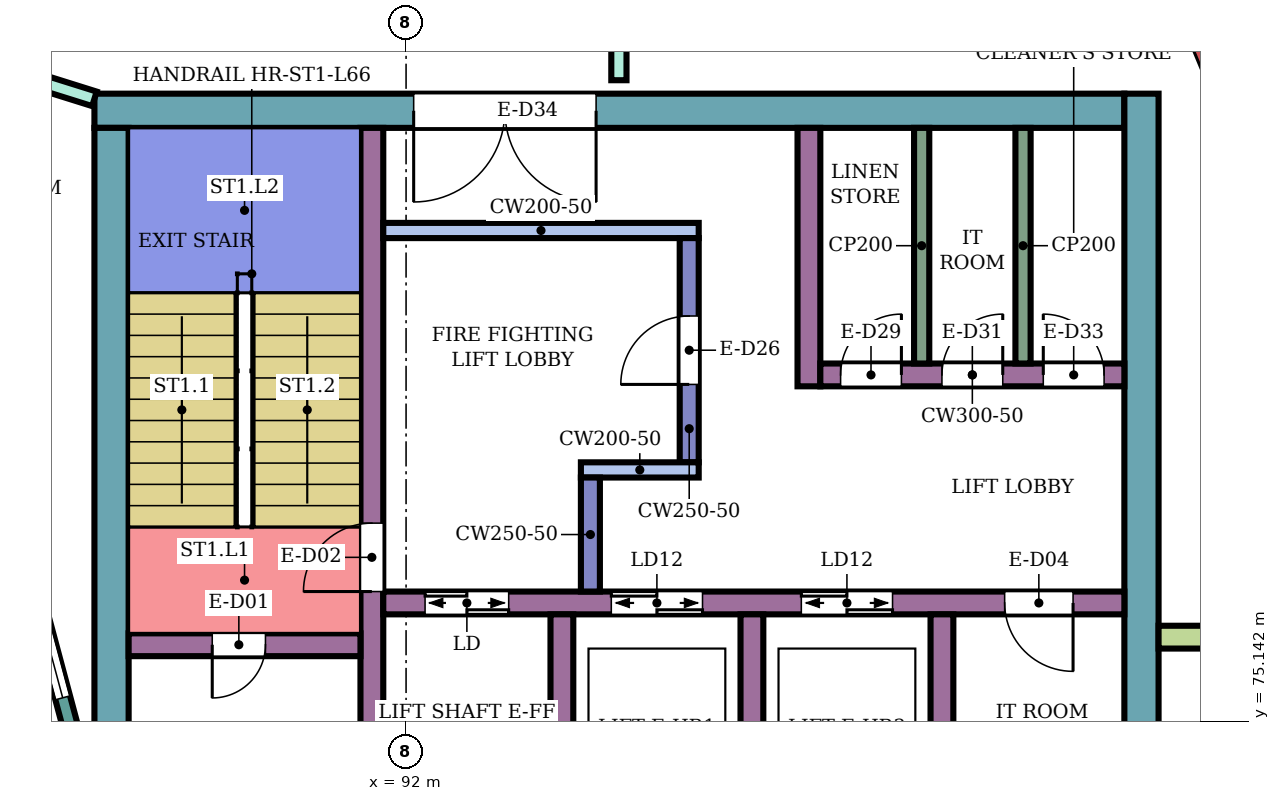
"""IFC4 building model, lengths in metres.
Left out: names, types, materials, properties, quantities, classifications, styles, units other than length and angle.
Written with IfcOpenShell. Run it as: python <this file> out.ifc"""

import sys

from ifc_helpers import new_model, si_unit, direction, frame, frame_2d, origin, place, context, subcontext, project, spatial, rectangle, extrude, element, fill, save


model = new_model("IFC4")
c1 = context("Model", 3, precision=1e-05, world=origin(), true_north=direction((0.0, 1.0)))
c2 = subcontext(c1, "Body", "Model", "MODEL_VIEW")
j1 = project(units=[si_unit("LENGTHUNIT", "METRE"), si_unit("PLANEANGLEUNIT", "RADIAN")], contexts=[c1])
p1 = place(None, origin())
s1 = spatial("IfcSite", under=j1, at=p1, CompositionType="ELEMENT")
p2 = place(p1, origin())
s2 = spatial("IfcBuilding", under=s1, at=p2, CompositionType="ELEMENT")
p3 = place(p2, frame((0.0, 0.0, 288.3)))
s3 = spatial("IfcBuildingStorey", under=s2, at=p3, CompositionType="ELEMENT", Elevation=288.3)
p4 = place(p3, frame((87.9, 83.175, 0.0), z_axis=(0.0, 0.0, 1.0), x_axis=(1.0, 0.0, 0.0)))
e1 = element("IfcWall", 1, at=p4, inside=s3, PredefinedType="SHEAR", context=c2, shape_type="SweptSolid", body=[
    extrude(rectangle(XDim=13.55, YDim=0.45, at=frame_2d((6.775, 0.0))), origin(), (0.0, 0.0, 1.0), 3.88),
])
p5 = place(p4, frame((4.2, 0.0, 0.0)))
e2 = element("IfcOpeningElement", 2, at=p5, cuts=e1, PredefinedType="OPENING", context=c2, shape_type="SweptSolid", body=[
    extrude(rectangle(XDim=2.4, YDim=2.4, at=frame_2d((1.2, 1.2))), frame((0.0, 0.235, 0.0), z_axis=(0.0, -1.0, 0.0), x_axis=(1.0, 0.0, 0.0)), (0.0, 0.0, 1.0), 0.47),
])
p6 = place(p3, frame((88.125, 75.0, 0.0), z_axis=(0.0, 0.0, 1.0), x_axis=(0.0, 1.0, 0.0)))
e3 = element("IfcWall", 3, at=p6, inside=s3, PredefinedType="SHEAR", context=c2, shape_type="SweptSolid", body=[
    extrude(rectangle(XDim=7.95, YDim=0.45, at=frame_2d((3.975, 0.0))), origin(), (0.0, 0.0, 1.0), 3.88),
])
p7 = place(p3, frame((101.675, 66.6, 0.0), z_axis=(0.0, 0.0, 1.0), x_axis=(0.0, 1.0, 0.0)))
e4 = element("IfcWall", 4, at=p7, inside=s3, PredefinedType="SHEAR", context=c2, shape_type="SweptSolid", body=[
    extrude(rectangle(XDim=16.8, YDim=0.45, at=frame_2d((8.4, 0.0))), origin(), (0.0, 0.0, 1.0), 3.88),
])
p8 = place(p3, frame((91.55, 75.0, 0.0), z_axis=(0.0, 0.0, 1.0), x_axis=(0.0, 1.0, 0.0)))
e5 = element("IfcWall", 5, at=p8, inside=s3, PredefinedType="SHEAR", context=c2, shape_type="SweptSolid", body=[
    extrude(rectangle(XDim=7.95, YDim=0.3, at=frame_2d((3.975, 0.0))), origin(), (0.0, 0.0, 1.0), 3.88),
])
p9 = place(p8, frame((1.85, 0.0, 0.0)))
e6 = element("IfcOpeningElement", 6, at=p9, cuts=e5, PredefinedType="OPENING", context=c2, shape_type="SweptSolid", body=[
    extrude(rectangle(XDim=0.9, YDim=2.1, at=frame_2d((0.45, 1.05))), frame((0.0, 0.16, 0.0), z_axis=(0.0, -1.0, 0.0), x_axis=(1.0, 0.0, 0.0)), (0.0, 0.0, 1.0), 0.32),
])
p10 = place(p3, frame((88.35, 76.15, 0.0), z_axis=(0.0, 0.0, 1.0), x_axis=(1.0, 0.0, 0.0)))
e7 = element("IfcWall", 7, at=p10, inside=s3, PredefinedType="SHEAR", context=c2, shape_type="SweptSolid", body=[
    extrude(rectangle(XDim=3.05, YDim=0.3, at=frame_2d((1.525, 0.0))), origin(), (0.0, 0.0, 1.0), 3.88),
])
p11 = place(p10, frame((1.1, 0.0, 0.0)))
e8 = element("IfcOpeningElement", 8, at=p11, cuts=e7, PredefinedType="OPENING", context=c2, shape_type="SweptSolid", body=[
    extrude(rectangle(XDim=0.7, YDim=2.0, at=frame_2d((0.35, 1.0))), frame((0.0, 0.16, 0.0), z_axis=(0.0, -1.0, 0.0), x_axis=(1.0, 0.0, 0.0)), (0.0, 0.0, 1.0), 0.32),
])
p12 = place(p3, frame((91.7, 76.7, 0.0), z_axis=(0.0, 0.0, 1.0), x_axis=(1.0, 0.0, 0.0)))
e9 = element("IfcWall", 9, at=p12, inside=s3, PredefinedType="SHEAR", context=c2, shape_type="SweptSolid", body=[
    extrude(rectangle(XDim=9.75, YDim=0.3, at=frame_2d((4.875, 0.0))), origin(), (0.0, 0.0, 1.0), 3.88),
])
p13 = place(p12, frame((0.55, 0.0, 0.0)))
e10 = element("IfcOpeningElement", 10, at=p13, cuts=e9, PredefinedType="OPENING", context=c2, shape_type="SweptSolid", body=[
    extrude(rectangle(XDim=1.1, YDim=2.1, at=frame_2d((0.55, 1.05))), frame((0.0, 0.16, 0.0), z_axis=(0.0, -1.0, 0.0), x_axis=(1.0, 0.0, 0.0)), (0.0, 0.0, 1.0), 0.32),
])
p14 = place(p12, frame((3.0, 0.0, 0.0)))
e11 = element("IfcOpeningElement", 11, at=p14, cuts=e9, PredefinedType="OPENING", context=c2, shape_type="SweptSolid", body=[
    extrude(rectangle(XDim=1.2, YDim=2.1, at=frame_2d((0.6, 1.05))), frame((0.0, 0.16, 0.0), z_axis=(0.0, -1.0, 0.0), x_axis=(1.0, 0.0, 0.0)), (0.0, 0.0, 1.0), 0.32),
])
p15 = place(p12, frame((5.5, 0.0, 0.0)))
e12 = element("IfcOpeningElement", 12, at=p15, cuts=e9, PredefinedType="OPENING", context=c2, shape_type="SweptSolid", body=[
    extrude(rectangle(XDim=1.2, YDim=2.1, at=frame_2d((0.6, 1.05))), frame((0.0, 0.16, 0.0), z_axis=(0.0, -1.0, 0.0), x_axis=(1.0, 0.0, 0.0)), (0.0, 0.0, 1.0), 0.32),
])
p16 = place(p12, frame((8.175, 0.0, 0.0)))
e13 = element("IfcOpeningElement", 13, at=p16, cuts=e9, PredefinedType="OPENING", context=c2, shape_type="SweptSolid", body=[
    extrude(rectangle(XDim=0.9, YDim=2.1, at=frame_2d((0.45, 1.05))), frame((0.0, 0.16, 0.0), z_axis=(0.0, -1.0, 0.0), x_axis=(1.0, 0.0, 0.0)), (0.0, 0.0, 1.0), 0.32),
])
for number, where, z_axis, x_axis in (
    (14, (94.05, 74.0, 0.0), (0.0, 0.0, 1.0), (0.0, 1.0, 0.0)),
    (15, (96.55, 74.0, 0.0), (0.0, 0.0, 1.0), (0.0, 1.0, 0.0)),
    (16, (99.05, 74.0, 0.0), (0.0, 0.0, 1.0), (0.0, 1.0, 0.0)),
):
    element("IfcWall", number, at=place(p3, frame(where, z_axis=z_axis, x_axis=x_axis)), inside=s3, PredefinedType="SHEAR", context=c2, shape_type="SweptSolid", body=[
        extrude(rectangle(XDim=2.55, YDim=0.3, at=frame_2d((1.275, 0.0))), origin(), (0.0, 0.0, 1.0), 3.88),
    ])
p17 = place(p3, frame((91.7, 81.6, 0.0), z_axis=(0.0, 0.0, 1.0), x_axis=(1.0, 0.0, 0.0)))
e17 = element("IfcWall", 17, at=p17, inside=s3, PredefinedType="SHEAR", context=c2, shape_type="SweptSolid", body=[
    extrude(rectangle(XDim=4.15, YDim=0.2, at=frame_2d((2.075, 0.0))), origin(), (0.0, 0.0, 1.0), 3.88),
])
p18 = place(p3, frame((95.725, 78.55, 0.0), z_axis=(0.0, 0.0, 1.0), x_axis=(0.0, 1.0, 0.0)))
e18 = element("IfcWall", 18, at=p18, inside=s3, PredefinedType="SHEAR", context=c2, shape_type="SweptSolid", body=[
    extrude(rectangle(XDim=2.95, YDim=0.25, at=frame_2d((1.475, 0.0))), origin(), (0.0, 0.0, 1.0), 3.88),
])
p19 = place(p18, frame((1.025, 0.0, 0.0)))
e19 = element("IfcOpeningElement", 19, at=p19, cuts=e18, PredefinedType="OPENING", context=c2, shape_type="SweptSolid", body=[
    extrude(rectangle(XDim=0.9, YDim=2.1, at=frame_2d((0.45, 1.05))), frame((0.0, 0.135, 0.0), z_axis=(0.0, -1.0, 0.0), x_axis=(1.0, 0.0, 0.0)), (0.0, 0.0, 1.0), 0.27),
])
p20 = place(p3, frame((94.3, 78.45, 0.0), z_axis=(0.0, 0.0, 1.0), x_axis=(1.0, 0.0, 0.0)))
e20 = element("IfcWall", 20, at=p20, inside=s3, PredefinedType="SHEAR", context=c2, shape_type="SweptSolid", body=[
    extrude(rectangle(XDim=1.55, YDim=0.2, at=frame_2d((0.775, 0.0))), origin(), (0.0, 0.0, 1.0), 3.88),
])
p21 = place(p3, frame((94.425, 76.85, 0.0), z_axis=(0.0, 0.0, 1.0), x_axis=(0.0, 1.0, 0.0)))
e21 = element("IfcWall", 21, at=p21, inside=s3, PredefinedType="SHEAR", context=c2, shape_type="SweptSolid", body=[
    extrude(rectangle(XDim=1.5, YDim=0.25, at=frame_2d((0.75, 0.0))), origin(), (0.0, 0.0, 1.0), 3.88),
])
p22 = place(p3, frame((97.3, 79.55, 0.0), z_axis=(0.0, 0.0, 1.0), x_axis=(0.0, 1.0, 0.0)))
e22 = element("IfcWall", 22, at=p22, inside=s3, PredefinedType="SHEAR", context=c2, shape_type="SweptSolid", body=[
    extrude(rectangle(XDim=3.4, YDim=0.3, at=frame_2d((1.7, 0.0))), origin(), (0.0, 0.0, 1.0), 3.88),
])
p23 = place(p3, frame((97.45, 79.7, 0.0), z_axis=(0.0, 0.0, 1.0), x_axis=(1.0, 0.0, 0.0)))
e23 = element("IfcWall", 23, at=p23, inside=s3, PredefinedType="SHEAR", context=c2, shape_type="SweptSolid", body=[
    extrude(rectangle(XDim=4.0, YDim=0.3, at=frame_2d((2.0, 0.0))), origin(), (0.0, 0.0, 1.0), 3.88),
])
p24 = place(p23, frame((0.267, 0.0, 0.0)))
e24 = element("IfcOpeningElement", 24, at=p24, cuts=e23, PredefinedType="OPENING", context=c2, shape_type="SweptSolid", body=[
    extrude(rectangle(XDim=0.8, YDim=2.1, at=frame_2d((0.4, 1.05))), frame((0.0, 0.16, 0.0), z_axis=(0.0, -1.0, 0.0), x_axis=(1.0, 0.0, 0.0)), (0.0, 0.0, 1.0), 0.32),
])
p25 = place(p23, frame((1.6, 0.0, 0.0)))
e25 = element("IfcOpeningElement", 25, at=p25, cuts=e23, PredefinedType="OPENING", context=c2, shape_type="SweptSolid", body=[
    extrude(rectangle(XDim=0.8, YDim=2.1, at=frame_2d((0.4, 1.05))), frame((0.0, 0.16, 0.0), z_axis=(0.0, -1.0, 0.0), x_axis=(1.0, 0.0, 0.0)), (0.0, 0.0, 1.0), 0.32),
])
p26 = place(p23, frame((2.933, 0.0, 0.0)))
e26 = element("IfcOpeningElement", 26, at=p26, cuts=e23, PredefinedType="OPENING", context=c2, shape_type="SweptSolid", body=[
    extrude(rectangle(XDim=0.8, YDim=2.1, at=frame_2d((0.4, 1.05))), frame((0.0, 0.16, 0.0), z_axis=(0.0, -1.0, 0.0), x_axis=(1.0, 0.0, 0.0)), (0.0, 0.0, 1.0), 0.32),
])
p27 = place(p3, frame((101.9, 76.25, 0.0), z_axis=(0.0, 0.0, 1.0), x_axis=(1.0, 0.0, 0.0)))
e27 = element("IfcWall", 27, at=p27, inside=s3, PredefinedType="NOTDEFINED", context=c2, shape_type="SweptSolid", body=[
    extrude(rectangle(XDim=2.416, YDim=0.3, at=frame_2d((1.208, 0.0))), origin(), (0.0, 0.0, 1.0), 4.2),
])
p28 = place(p3, frame((87.604, 75.0, 0.0), z_axis=(0.0, 0.0, 1.0), x_axis=(-0.258789828301, 0.965933654434, 0.0)))
e28 = element("IfcWall", 28, at=p28, inside=s3, PredefinedType="NOTDEFINED", context=c2, shape_type="SweptSolid", body=[
    extrude(rectangle(XDim=3.936, YDim=0.2, at=frame_2d((1.968, 0.0))), origin(), (0.0, 0.0, 1.0), 4.2),
])
p29 = place(p28, frame((0.468, 0.0, 0.9)))
e29 = element("IfcOpeningElement", 29, at=p29, cuts=e28, PredefinedType="OPENING", context=c2, shape_type="SweptSolid", body=[
    extrude(rectangle(XDim=3.0, YDim=2.3, at=frame_2d((1.5, 1.15))), frame((0.0, 0.11, 0.0), z_axis=(0.0, -1.0, 0.0), x_axis=(1.0, 0.0, 0.0)), (0.0, 0.0, 1.0), 0.22),
])
p30 = place(p3, frame((85.587, 84.057, 0.0), z_axis=(0.0, 0.0, 1.0), x_axis=(0.954239513179, -0.299043393987, 0.0)))
e30 = element("IfcWall", 30, at=p30, inside=s3, PredefinedType="PARTITIONING", context=c2, shape_type="SweptSolid", body=[
    extrude(rectangle(XDim=2.424, YDim=0.2, at=frame_2d((1.212, 0.0))), origin(), (0.0, 0.0, 1.0), 3.75),
])
p31 = place(p30, frame((0.762, 0.0, 0.0)))
e31 = element("IfcOpeningElement", 31, at=p31, cuts=e30, PredefinedType="OPENING", context=c2, shape_type="SweptSolid", body=[
    extrude(rectangle(XDim=0.9, YDim=2.1, at=frame_2d((0.45, 1.05))), frame((0.0, 0.11, 0.0), z_axis=(0.0, -1.0, 0.0), x_axis=(1.0, 0.0, 0.0)), (0.0, 0.0, 1.0), 0.22),
])
p32 = place(p3, frame((94.8, 83.577, 0.0), z_axis=(0.0, 0.0, 1.0), x_axis=(0.0, 1.0, 0.0)))
e32 = element("IfcWall", 32, at=p32, inside=s3, PredefinedType="PARTITIONING", context=c2, shape_type="SweptSolid", body=[
    extrude(rectangle(XDim=1.323, YDim=0.2, at=frame_2d((0.662, 0.0))), origin(), (0.0, 0.0, 1.0), 3.75),
])
for number, where, z_axis, x_axis in (
    (33, (98.783, 79.85, 0.0), (0.0, 0.0, 1.0), (0.0, 1.0, 0.0)),
    (34, (100.117, 79.85, 0.0), (0.0, 0.0, 1.0), (0.0, 1.0, 0.0)),
):
    element("IfcWall", number, at=place(p3, frame(where, z_axis=z_axis, x_axis=x_axis)), inside=s3, PredefinedType="PARTITIONING", context=c2, shape_type="SweptSolid", body=[
        extrude(rectangle(XDim=3.1, YDim=0.2, at=frame_2d((1.55, 0.0))), origin(), (0.0, 0.0, 1.0), 3.88),
    ])
p33 = place(p29, origin())
e35 = element("IfcWindow", 35, at=p33, inside=s3, PartitioningType="SINGLE_PANEL", PredefinedType="WINDOW", context=c2, shape_type="SweptSolid", body=[
    extrude(rectangle(XDim=3.0, YDim=2.3, at=frame_2d((1.5, 1.15))), frame((0.0, 0.03, 0.0), z_axis=(0.0, -1.0, 0.0), x_axis=(1.0, 0.0, 0.0)), (0.0, 0.0, 1.0), 0.06),
])
fill(e29, e35)
p34 = place(p11, frame((0.7, 0.0, 0.0), z_axis=(0.0, 0.0, 1.0), x_axis=(-1.0, 0.0, 0.0)))
e36 = element("IfcDoor", 36, at=p34, inside=s3, OperationType="SINGLE_SWING_RIGHT", PredefinedType="DOOR", context=c2, shape_type="SweptSolid", body=[
    extrude(rectangle(XDim=0.7, YDim=2.0, at=frame_2d((0.35, 1.0))), frame((0.0, 0.025, 0.0), z_axis=(0.0, -1.0, 0.0), x_axis=(1.0, 0.0, 0.0)), (0.0, 0.0, 1.0), 0.05),
])
fill(e8, e36)
p35 = place(p9, origin())
e37 = element("IfcDoor", 37, at=p35, inside=s3, OperationType="SINGLE_SWING_LEFT", PredefinedType="DOOR", context=c2, shape_type="SweptSolid", body=[
    extrude(rectangle(XDim=0.9, YDim=2.1, at=frame_2d((0.45, 1.05))), frame((0.0, 0.025, 0.0), z_axis=(0.0, -1.0, 0.0), x_axis=(1.0, 0.0, 0.0)), (0.0, 0.0, 1.0), 0.05),
])
fill(e6, e37)
p36 = place(p13, origin())
e38 = element("IfcDoor", 38, at=p36, inside=s3, OperationType="DOUBLE_DOOR_SLIDING", PredefinedType="DOOR", context=c2, shape_type="SweptSolid", body=[
    extrude(rectangle(XDim=1.1, YDim=2.1, at=frame_2d((0.55, 1.05))), frame((0.0, 0.025, 0.0), z_axis=(0.0, -1.0, 0.0), x_axis=(1.0, 0.0, 0.0)), (0.0, 0.0, 1.0), 0.05),
])
fill(e10, e38)
p37 = place(p14, origin())
e39 = element("IfcDoor", 39, at=p37, inside=s3, OperationType="DOUBLE_DOOR_SLIDING", PredefinedType="DOOR", context=c2, shape_type="SweptSolid", body=[
    extrude(rectangle(XDim=1.2, YDim=2.1, at=frame_2d((0.6, 1.05))), frame((0.0, 0.025, 0.0), z_axis=(0.0, -1.0, 0.0), x_axis=(1.0, 0.0, 0.0)), (0.0, 0.0, 1.0), 0.05),
])
fill(e11, e39)
p38 = place(p15, origin())
e40 = element("IfcDoor", 40, at=p38, inside=s3, OperationType="DOUBLE_DOOR_SLIDING", PredefinedType="DOOR", context=c2, shape_type="SweptSolid", body=[
    extrude(rectangle(XDim=1.2, YDim=2.1, at=frame_2d((0.6, 1.05))), frame((0.0, 0.025, 0.0), z_axis=(0.0, -1.0, 0.0), x_axis=(1.0, 0.0, 0.0)), (0.0, 0.0, 1.0), 0.05),
])
fill(e12, e40)
p39 = place(p16, frame((0.9, 0.0, 0.0), z_axis=(0.0, 0.0, 1.0), x_axis=(-1.0, 0.0, 0.0)))
e41 = element("IfcDoor", 41, at=p39, inside=s3, OperationType="SINGLE_SWING_LEFT", PredefinedType="DOOR", context=c2, shape_type="SweptSolid", body=[
    extrude(rectangle(XDim=0.9, YDim=2.1, at=frame_2d((0.45, 1.05))), frame((0.0, 0.025, 0.0), z_axis=(0.0, -1.0, 0.0), x_axis=(1.0, 0.0, 0.0)), (0.0, 0.0, 1.0), 0.05),
])
fill(e13, e41)
p40 = place(p19, origin())
e42 = element("IfcDoor", 42, at=p40, inside=s3, OperationType="SINGLE_SWING_LEFT", PredefinedType="DOOR", context=c2, shape_type="SweptSolid", body=[
    extrude(rectangle(XDim=0.9, YDim=2.1, at=frame_2d((0.45, 1.05))), frame((0.0, 0.025, 0.0), z_axis=(0.0, -1.0, 0.0), x_axis=(1.0, 0.0, 0.0)), (0.0, 0.0, 1.0), 0.05),
])
fill(e19, e42)
p41 = place(p24, origin())
e43 = element("IfcDoor", 43, at=p41, inside=s3, OperationType="SINGLE_SWING_RIGHT", PredefinedType="DOOR", context=c2, shape_type="SweptSolid", body=[
    extrude(rectangle(XDim=0.8, YDim=2.1, at=frame_2d((0.4, 1.05))), frame((0.0, 0.025, 0.0), z_axis=(0.0, -1.0, 0.0), x_axis=(1.0, 0.0, 0.0)), (0.0, 0.0, 1.0), 0.05),
])
fill(e24, e43)
p42 = place(p25, origin())
e44 = element("IfcDoor", 44, at=p42, inside=s3, OperationType="SINGLE_SWING_RIGHT", PredefinedType="DOOR", context=c2, shape_type="SweptSolid", body=[
    extrude(rectangle(XDim=0.8, YDim=2.1, at=frame_2d((0.4, 1.05))), frame((0.0, 0.025, 0.0), z_axis=(0.0, -1.0, 0.0), x_axis=(1.0, 0.0, 0.0)), (0.0, 0.0, 1.0), 0.05),
])
fill(e25, e44)
p43 = place(p26, origin())
e45 = element("IfcDoor", 45, at=p43, inside=s3, OperationType="SINGLE_SWING_LEFT", PredefinedType="DOOR", context=c2, shape_type="SweptSolid", body=[
    extrude(rectangle(XDim=0.8, YDim=2.1, at=frame_2d((0.4, 1.05))), frame((0.0, 0.025, 0.0), z_axis=(0.0, -1.0, 0.0), x_axis=(1.0, 0.0, 0.0)), (0.0, 0.0, 1.0), 0.05),
])
fill(e26, e45)
p44 = place(p5, frame((2.4, 0.0, 0.0), z_axis=(0.0, 0.0, 1.0), x_axis=(-1.0, 0.0, 0.0)))
e46 = element("IfcDoor", 46, at=p44, inside=s3, OperationType="DOUBLE_DOOR_SINGLE_SWING", PredefinedType="DOOR", context=c2, shape_type="SweptSolid", body=[
    extrude(rectangle(XDim=2.4, YDim=2.4, at=frame_2d((1.2, 1.2))), frame((0.0, 0.025, 0.0), z_axis=(0.0, -1.0, 0.0), x_axis=(1.0, 0.0, 0.0)), (0.0, 0.0, 1.0), 0.05),
])
fill(e2, e46)
save(model, sys.argv[1])
